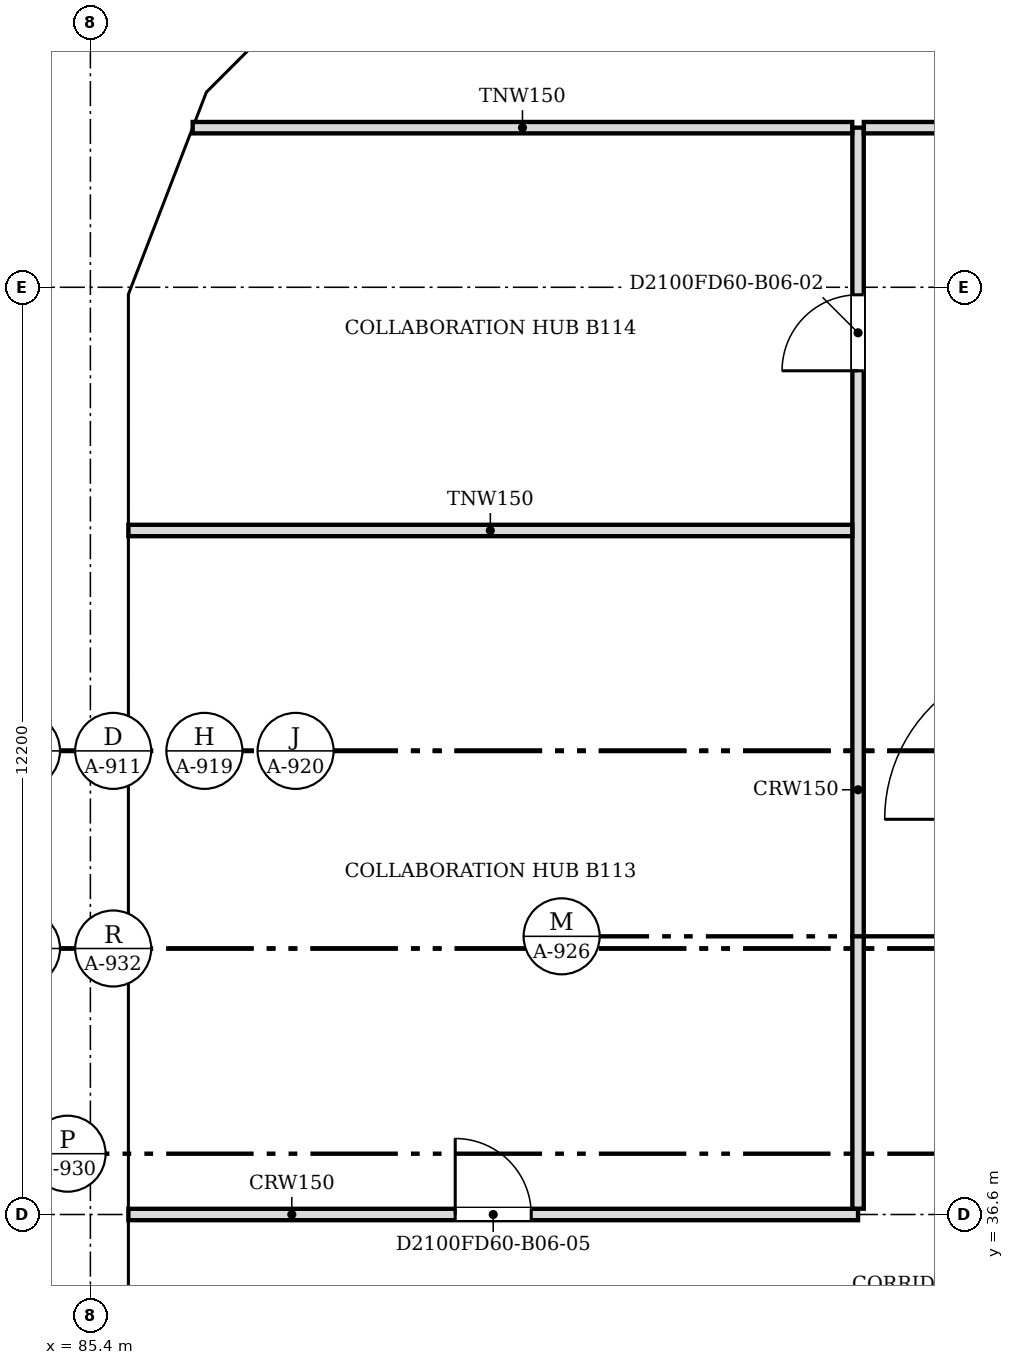
"""IFC4 building model, lengths in metres.
Left out: names, types, materials, properties, quantities, classifications, styles, units other than length and angle.
Written with IfcOpenShell. Run it as: python <this file> out.ifc"""

import sys

from ifc_helpers import new_model, si_unit, direction, frame, frame_2d, origin, place, context, subcontext, project, spatial, polyline, rectangle, outline, extrude, faceted_brep, source, transform, mapped, element, fill, save


model = new_model("IFC4")
c1 = context("Model", 3, precision=1e-05, world=origin(), true_north=direction((0.0, 1.0)))
c2 = subcontext(c1, "Body", "Model", "MODEL_VIEW")
j1 = project(units=[si_unit("LENGTHUNIT", "METRE"), si_unit("PLANEANGLEUNIT", "RADIAN")], contexts=[c1])
p1 = place(None, origin())
s1 = spatial("IfcSite", under=j1, at=p1, CompositionType="ELEMENT")
p2 = place(p1, origin())
s2 = spatial("IfcBuilding", under=s1, at=p2, CompositionType="ELEMENT")
p3 = place(p2, frame((0.0, 0.0, 56.2)))
s3 = spatial("IfcBuildingStorey", under=s2, at=p3, CompositionType="ELEMENT", Elevation=56.2)
m1 = source(origin(), c2, "Body", "Brep", [
    faceted_brep([(2.944, -0.25, 0.0), (2.997, -0.25, 0.068), (2.997, -0.25, 7.532), (2.944, -0.25, 7.6), (0.0, -0.25, 3.8), (0.053, 0.25, 3.868), (2.891, 0.25, 7.532), (2.891, 0.25, 0.068), (0.053, 0.25, 3.732), (2.944, 0.0, 0.0), (2.944, 0.0, 7.6), (0.0, 0.0, 3.8)], [[[0, 1, 2, 3, 4]], [[5, 6, 7, 8]], [[1, 0, 9]], [[10, 3, 2]], [[6, 5, 11, 4, 3, 10]], [[8, 7, 9, 0, 4, 11]], [[8, 11, 5]], [[1, 9, 7, 6, 10, 2]]]),
])
p4 = place(p3, frame((88.794, 53.588, -3.8), z_axis=(0.0, 0.0, 1.0), x_axis=(-0.707066050402, -0.707147509625, 0.0)))
e1 = element("IfcWall", 1, at=p4, inside=s3, PredefinedType="SOLIDWALL", context=c2, shape_type="MappedRepresentation", body=[
    mapped(m1, transform((0.0, 0.0, 0.0), scale=1.0)),
])
m2 = source(origin(), c2, "Body", "SweptSolid", [
    extrude(outline(polyline([(2.744, 6.934), (0.316, 3.8), (2.744, 0.667), (2.744, 6.934)])), frame((0.0, 0.26, 0.0), z_axis=(0.0, -1.0, 0.0), x_axis=(1.0, 0.0, 0.0)), (0.0, 0.0, 1.0), 0.52),
])
p5 = place(p4, origin())
e2 = element("IfcOpeningElement", 2, at=p5, cuts=e1, PredefinedType="OPENING", context=c2, shape_type="MappedRepresentation", body=[
    mapped(m2, transform((0.0, 0.0, 0.0), scale=1.0)),
])
m3 = source(origin(), c2, "Body", "Brep", [
    faceted_brep([(0.053, -0.25, 0.0), (3.003, -0.25, 3.8), (0.053, -0.25, 7.6), (0.0, -0.25, 7.532), (0.0, -0.25, 0.068), (0.106, 0.25, 7.532), (2.957, 0.25, 3.86), (2.957, 0.25, 3.74), (0.106, 0.25, 0.068), (3.003, 0.0, 3.8), (0.053, 0.0, 0.0), (0.053, 0.0, 7.6)], [[[0, 1, 2, 3, 4]], [[5, 6, 7, 8]], [[8, 7, 9, 1, 0, 10]], [[6, 5, 11, 2, 1, 9]], [[3, 2, 11]], [[10, 0, 4]], [[8, 10, 4, 3, 11, 5]], [[9, 7, 6]]]),
])
p6 = place(p3, frame((86.731, 51.556, -3.8), z_axis=(0.0, 0.0, 1.0), x_axis=(-0.359855894603, -0.933007896601, 0.0)))
e3 = element("IfcWall", 3, at=p6, inside=s3, PredefinedType="SOLIDWALL", context=c2, shape_type="MappedRepresentation", body=[
    mapped(m3, transform((0.0, 0.0, 0.0), scale=1.0)),
])
m4 = source(origin(), c2, "Body", "SweptSolid", [
    extrude(outline(polyline([(0.253, 0.665), (2.687, 3.8), (0.253, 6.935), (0.253, 0.665)])), frame((0.0, 0.26, 0.0), z_axis=(0.0, -1.0, 0.0), x_axis=(1.0, 0.0, 0.0)), (0.0, 0.0, 1.0), 0.52),
])
p7 = place(p6, origin())
e4 = element("IfcOpeningElement", 4, at=p7, cuts=e3, PredefinedType="OPENING", context=c2, shape_type="MappedRepresentation", body=[
    mapped(m4, transform((0.0, 0.0, 0.0), scale=1.0)),
])
m5 = source(origin(), c2, "Body", "Brep", [
    faceted_brep([(3.003, -0.25, 0.0), (6.053, -0.25, 3.8), (3.003, -0.25, 7.6), (0.0, -0.25, 3.8), (0.047, 0.25, 3.859), (3.003, 0.25, 7.6), (6.053, 0.25, 3.8), (3.003, 0.25, 0.0), (0.047, 0.25, 3.741), (0.0, 0.0, 3.8)], [[[0, 1, 2, 3]], [[4, 5, 6, 7, 8]], [[7, 6, 1, 0]], [[6, 5, 2, 1]], [[5, 4, 9, 3, 2]], [[8, 7, 0, 3, 9]], [[8, 9, 4]]]),
])
p8 = place(p3, frame((85.65, 48.753, -3.8), z_axis=(0.0, 0.0, 1.0), x_axis=(0.0, -1.0, 0.0)))
e5 = element("IfcWall", 5, at=p8, inside=s3, PredefinedType="SOLIDWALL", context=c2, shape_type="MappedRepresentation", body=[
    mapped(m5, transform((0.0, 0.0, 0.0), scale=1.0)),
])
m6 = source(origin(), c2, "Body", "SweptSolid", [
    extrude(outline(polyline([(3.005, 0.401), (5.733, 3.8), (3.005, 7.199), (0.319, 3.8), (3.005, 0.401)])), frame((0.0, 0.26, 0.0), z_axis=(0.0, -1.0, 0.0), x_axis=(1.0, 0.0, 0.0)), (0.0, 0.0, 1.0), 0.52),
])
p9 = place(p8, origin())
e6 = element("IfcOpeningElement", 6, at=p9, cuts=e5, PredefinedType="OPENING", context=c2, shape_type="MappedRepresentation", body=[
    mapped(m6, transform((0.0, 0.0, 0.0), scale=1.0)),
])
m7 = source(origin(), c2, "Body", "Brep", [
    faceted_brep([(3.05, -0.25, 0.0), (6.1, -0.25, 3.8), (6.1, -0.25, 3.8), (3.05, -0.25, 7.6), (0.0, -0.25, 3.8), (0.0, 0.25, 3.8), (3.05, 0.25, 7.6), (6.1, 0.25, 3.8), (6.1, 0.25, 3.8), (3.05, 0.25, 0.0)], [[[0, 1, 2, 3, 4]], [[5, 6, 7, 8, 9]], [[9, 8, 1, 0]], [[7, 6, 3, 2]], [[6, 5, 4, 3]], [[5, 9, 0, 4]], [[1, 8, 7, 2]]]),
])
p10 = place(p3, frame((85.65, 42.7, -3.8), z_axis=(0.0, 0.0, 1.0), x_axis=(0.0, -1.0, 0.0)))
e7 = element("IfcWall", 7, at=p10, inside=s3, PredefinedType="SOLIDWALL", context=c2, shape_type="MappedRepresentation", body=[
    mapped(m7, transform((0.0, 0.0, 0.0), scale=1.0)),
])
m8 = source(origin(), c2, "Body", "SweptSolid", [
    extrude(outline(polyline([(3.05, 0.399), (5.78, 3.8), (3.05, 7.201), (0.321, 3.8), (3.05, 0.399)])), frame((0.0, 0.26, 0.0), z_axis=(0.0, -1.0, 0.0), x_axis=(1.0, 0.0, 0.0)), (0.0, 0.0, 1.0), 0.52),
])
p11 = place(p10, origin())
e8 = element("IfcOpeningElement", 8, at=p11, cuts=e7, PredefinedType="OPENING", context=c2, shape_type="MappedRepresentation", body=[
    mapped(m8, transform((0.0, 0.0, 0.0), scale=1.0)),
])
m9 = source(origin(), c2, "Body", "SweptSolid", [
    extrude(outline(polyline([(3.05, 0.0), (6.1, 3.8), (3.05, 7.6), (0.0, 3.8), (3.05, 0.0)])), frame((0.0, 0.25, 0.0), z_axis=(0.0, -1.0, 0.0), x_axis=(1.0, 0.0, 0.0)), (0.0, 0.0, 1.0), 0.5),
])
p12 = place(p3, frame((85.65, 36.6, -3.8), z_axis=(0.0, 0.0, 1.0), x_axis=(0.0, -1.0, 0.0)))
e9 = element("IfcWall", 9, at=p12, inside=s3, PredefinedType="SOLIDWALL", context=c2, shape_type="MappedRepresentation", body=[
    mapped(m9, transform((0.0, 0.0, 0.0), scale=1.0)),
])
p13 = place(p12, origin())
e10 = element("IfcOpeningElement", 10, at=p13, cuts=e9, PredefinedType="OPENING", context=c2, shape_type="MappedRepresentation", body=[
    mapped(m8, transform((0.0, 0.0, 0.0), scale=1.0)),
])
p14 = place(p2, frame((0.0, 0.0, 60.0)))
s4 = spatial("IfcBuildingStorey", under=s2, at=p14, CompositionType="ELEMENT", Elevation=60.0)
m10 = source(origin(), c2, "Body", "Brep", [
    faceted_brep([(0.053, -0.25, 0.0), (2.997, -0.25, 3.8), (0.053, -0.25, 7.6), (0.0, -0.25, 7.532), (0.0, -0.25, 0.068), (0.106, 0.25, 7.532), (2.944, 0.25, 3.868), (2.944, 0.25, 3.732), (0.106, 0.25, 0.068), (2.997, 0.0, 3.8), (0.053, 0.0, 0.0), (0.053, 0.0, 7.6)], [[[0, 1, 2, 3, 4]], [[5, 6, 7, 8]], [[8, 7, 9, 1, 0, 10]], [[6, 5, 11, 2, 1, 9]], [[3, 2, 11]], [[10, 0, 4]], [[8, 10, 4, 3, 11, 5]], [[9, 7, 6]]]),
])
p15 = place(p14, frame((88.831, 53.625, -3.8), z_axis=(0.0, 0.0, 1.0), x_axis=(-0.707147509625, -0.707066050402, 0.0)))
e11 = element("IfcWall", 11, at=p15, inside=s4, PredefinedType="SOLIDWALL", context=c2, shape_type="MappedRepresentation", body=[
    mapped(m10, transform((0.0, 0.0, 0.0), scale=1.0)),
])
m11 = source(origin(), c2, "Body", "SweptSolid", [
    extrude(outline(polyline([(0.253, 0.666), (2.681, 3.8), (0.253, 6.934), (0.253, 0.666)])), frame((0.0, 0.26, 0.0), z_axis=(0.0, -1.0, 0.0), x_axis=(1.0, 0.0, 0.0)), (0.0, 0.0, 1.0), 0.52),
])
p16 = place(p15, origin())
e12 = element("IfcOpeningElement", 12, at=p16, cuts=e11, PredefinedType="OPENING", context=c2, shape_type="MappedRepresentation", body=[
    mapped(m11, transform((0.0, 0.0, 0.0), scale=1.0)),
])
m12 = source(origin(), c2, "Body", "Brep", [
    faceted_brep([(2.95, -0.25, 0.0), (2.997, -0.25, 0.059), (2.997, -0.25, 7.541), (2.95, -0.25, 7.6), (0.0, -0.25, 3.8), (0.053, 0.25, 3.868), (2.904, 0.25, 7.54), (2.904, 0.25, 0.06), (0.053, 0.25, 3.732), (2.95, 0.0, 0.0), (2.95, 0.0, 7.6), (0.0, 0.0, 3.8)], [[[0, 1, 2, 3, 4]], [[5, 6, 7, 8]], [[1, 0, 9]], [[10, 3, 2]], [[6, 5, 11, 4, 3, 10]], [[8, 7, 9, 0, 4, 11]], [[8, 11, 5]], [[1, 9, 7, 6, 10, 2]]]),
])
p17 = place(p14, frame((86.712, 51.506, -3.8), z_axis=(0.0, 0.0, 1.0), x_axis=(-0.359874094142, -0.933000876937, 0.0)))
e13 = element("IfcWall", 13, at=p17, inside=s4, PredefinedType="SOLIDWALL", context=c2, shape_type="MappedRepresentation", body=[
    mapped(m12, transform((0.0, 0.0, 0.0), scale=1.0)),
])
m13 = source(origin(), c2, "Body", "SweptSolid", [
    extrude(outline(polyline([(2.75, 6.935), (0.316, 3.8), (2.75, 0.665), (2.75, 6.935)])), frame((0.0, 0.26, 0.0), z_axis=(0.0, -1.0, 0.0), x_axis=(1.0, 0.0, 0.0)), (0.0, 0.0, 1.0), 0.52),
])
p18 = place(p17, origin())
e14 = element("IfcOpeningElement", 14, at=p18, cuts=e13, PredefinedType="OPENING", context=c2, shape_type="MappedRepresentation", body=[
    mapped(m13, transform((0.0, 0.0, 0.0), scale=1.0)),
])
m14 = source(origin(), c2, "Body", "Brep", [
    faceted_brep([(0.047, -0.25, 0.0), (3.05, -0.25, 3.8), (0.047, -0.25, 7.6), (0.0, -0.25, 7.54), (0.0, -0.25, 0.06), (0.093, 0.25, 7.541), (3.05, 0.25, 3.8), (0.093, 0.25, 0.059), (0.047, 0.0, 0.0), (0.047, 0.0, 7.6)], [[[0, 1, 2, 3, 4]], [[5, 6, 7]], [[7, 6, 1, 0, 8]], [[6, 5, 9, 2, 1]], [[3, 2, 9]], [[8, 0, 4]], [[7, 8, 4, 3, 9, 5]]]),
])
p19 = place(p14, frame((85.65, 48.8, -3.8), z_axis=(0.0, 0.0, 1.0), x_axis=(0.0, -1.0, 0.0)))
e15 = element("IfcWall", 15, at=p19, inside=s4, PredefinedType="SOLIDWALL", context=c2, shape_type="MappedRepresentation", body=[
    mapped(m14, transform((0.0, 0.0, 0.0), scale=1.0)),
])
m15 = source(origin(), c2, "Body", "SweptSolid", [
    extrude(outline(polyline([(0.247, 0.656), (2.731, 3.8), (0.247, 6.944), (0.247, 0.656)])), frame((0.0, 0.26, 0.0), z_axis=(0.0, -1.0, 0.0), x_axis=(1.0, 0.0, 0.0)), (0.0, 0.0, 1.0), 0.52),
])
p20 = place(p19, origin())
e16 = element("IfcOpeningElement", 16, at=p20, cuts=e15, PredefinedType="OPENING", context=c2, shape_type="MappedRepresentation", body=[
    mapped(m15, transform((0.0, 0.0, 0.0), scale=1.0)),
])
p21 = place(p14, frame((85.65, 45.75, -3.8), z_axis=(0.0, 0.0, 1.0), x_axis=(0.0, -1.0, 0.0)))
e17 = element("IfcWall", 17, at=p21, inside=s4, PredefinedType="SOLIDWALL", context=c2, shape_type="MappedRepresentation", body=[
    mapped(m9, transform((0.0, 0.0, 0.0), scale=1.0)),
])
p22 = place(p21, origin())
e18 = element("IfcOpeningElement", 18, at=p22, cuts=e17, PredefinedType="OPENING", context=c2, shape_type="MappedRepresentation", body=[
    mapped(m8, transform((0.0, 0.0, 0.0), scale=1.0)),
])
p23 = place(p14, frame((85.65, 39.65, -3.8), z_axis=(0.0, 0.0, 1.0), x_axis=(0.0, -1.0, 0.0)))
e19 = element("IfcWall", 19, at=p23, inside=s4, PredefinedType="SOLIDWALL", context=c2, shape_type="MappedRepresentation", body=[
    mapped(m7, transform((0.0, 0.0, 0.0), scale=1.0)),
])
p24 = place(p23, origin())
e20 = element("IfcOpeningElement", 20, at=p24, cuts=e19, PredefinedType="OPENING", context=c2, shape_type="MappedRepresentation", body=[
    mapped(m8, transform((0.0, 0.0, 0.0), scale=1.0)),
])
p25 = place(p3, frame((85.9, 36.6, 0.0), z_axis=(0.0, 0.0, 1.0), x_axis=(1.0, 0.0, 0.0)))
e21 = element("IfcWall", 21, at=p25, inside=s3, PredefinedType="PARTITIONING", context=c2, shape_type="SweptSolid", body=[
    extrude(rectangle(XDim=9.6, YDim=0.15, at=frame_2d((4.8, 0.0))), origin(), (0.0, 0.0, 1.0), 3.067),
])
m16 = source(origin(), c2, "Body", "SweptSolid", [
    extrude(rectangle(XDim=1.0, YDim=2.1, at=frame_2d((0.5, 1.05))), frame((0.0, 0.085, 0.0), z_axis=(0.0, -1.0, 0.0), x_axis=(1.0, 0.0, 0.0)), (0.0, 0.0, 1.0), 0.17),
])
p26 = place(p25, frame((4.3, 0.0, 0.0)))
e22 = element("IfcOpeningElement", 22, at=p26, cuts=e21, PredefinedType="OPENING", context=c2, shape_type="MappedRepresentation", body=[
    mapped(m16, transform((0.0, 0.0, 0.0), scale=1.0)),
])
p27 = place(p3, frame((95.5, 36.676, 0.0), z_axis=(0.0, 0.0, 1.0), x_axis=(0.0, 1.0, 0.0)))
e23 = element("IfcWall", 23, at=p27, inside=s3, PredefinedType="PARTITIONING", context=c2, shape_type="SweptSolid", body=[
    extrude(rectangle(XDim=14.224, YDim=0.15, at=frame_2d((7.112, 0.0))), origin(), (0.0, 0.0, 1.0), 3.067),
])
p28 = place(p27, frame((11.025, 0.0, 0.0)))
e24 = element("IfcOpeningElement", 24, at=p28, cuts=e23, PredefinedType="OPENING", context=c2, shape_type="MappedRepresentation", body=[
    mapped(m16, transform((0.0, 0.0, 0.0), scale=1.0)),
])
p29 = place(p3, frame((85.9, 45.6, 0.0), z_axis=(0.0, 0.0, 1.0), x_axis=(1.0, 0.0, 0.0)))
e25 = element("IfcWall", 25, at=p29, inside=s3, PredefinedType="PARTITIONING", context=c2, shape_type="SweptSolid", body=[
    extrude(rectangle(XDim=9.524, YDim=0.15, at=frame_2d((4.762, 0.0))), origin(), (0.0, 0.0, 1.0), 3.067),
])
p30 = place(p3, frame((86.746, 50.9, 0.0), z_axis=(0.0, 0.0, 1.0), x_axis=(1.0, 0.0, 0.0)))
e26 = element("IfcWall", 26, at=p30, inside=s3, PredefinedType="PARTITIONING", context=c2, shape_type="SweptSolid", body=[
    extrude(rectangle(XDim=8.678, YDim=0.15, at=frame_2d((4.339, 0.0))), origin(), (0.0, 0.0, 1.0), 3.067),
])
p31 = place(p3, frame((95.576, 50.9, 0.0), z_axis=(0.0, 0.0, 1.0), x_axis=(1.0, 0.0, 0.0)))
e27 = element("IfcWall", 27, at=p31, inside=s3, PredefinedType="PARTITIONING", context=c2, shape_type="SweptSolid", body=[
    extrude(rectangle(XDim=4.424, YDim=0.15, at=frame_2d((2.212, 0.0))), origin(), (0.0, 0.0, 1.0), 3.067),
])
m17 = source(origin(), c2, "Body", "SweptSolid", [
    extrude(rectangle(XDim=1.0, YDim=2.1, at=frame_2d((0.5, 1.05))), frame((0.0, 0.025, 0.0), z_axis=(0.0, -1.0, 0.0), x_axis=(1.0, 0.0, 0.0)), (0.0, 0.0, 1.0), 0.05),
])
p32 = place(p28, origin())
e28 = element("IfcDoor", 28, at=p32, inside=s3, OperationType="SINGLE_SWING_LEFT", PredefinedType="DOOR", context=c2, shape_type="MappedRepresentation", body=[
    mapped(m17, transform((0.0, 0.0, 0.0), scale=1.0)),
])
fill(e24, e28)
p33 = place(p26, origin())
e29 = element("IfcDoor", 29, at=p33, inside=s3, OperationType="SINGLE_SWING_LEFT", PredefinedType="DOOR", context=c2, shape_type="MappedRepresentation", body=[
    mapped(m17, transform((0.0, 0.0, 0.0), scale=1.0)),
])
fill(e22, e29)
save(model, sys.argv[1])
